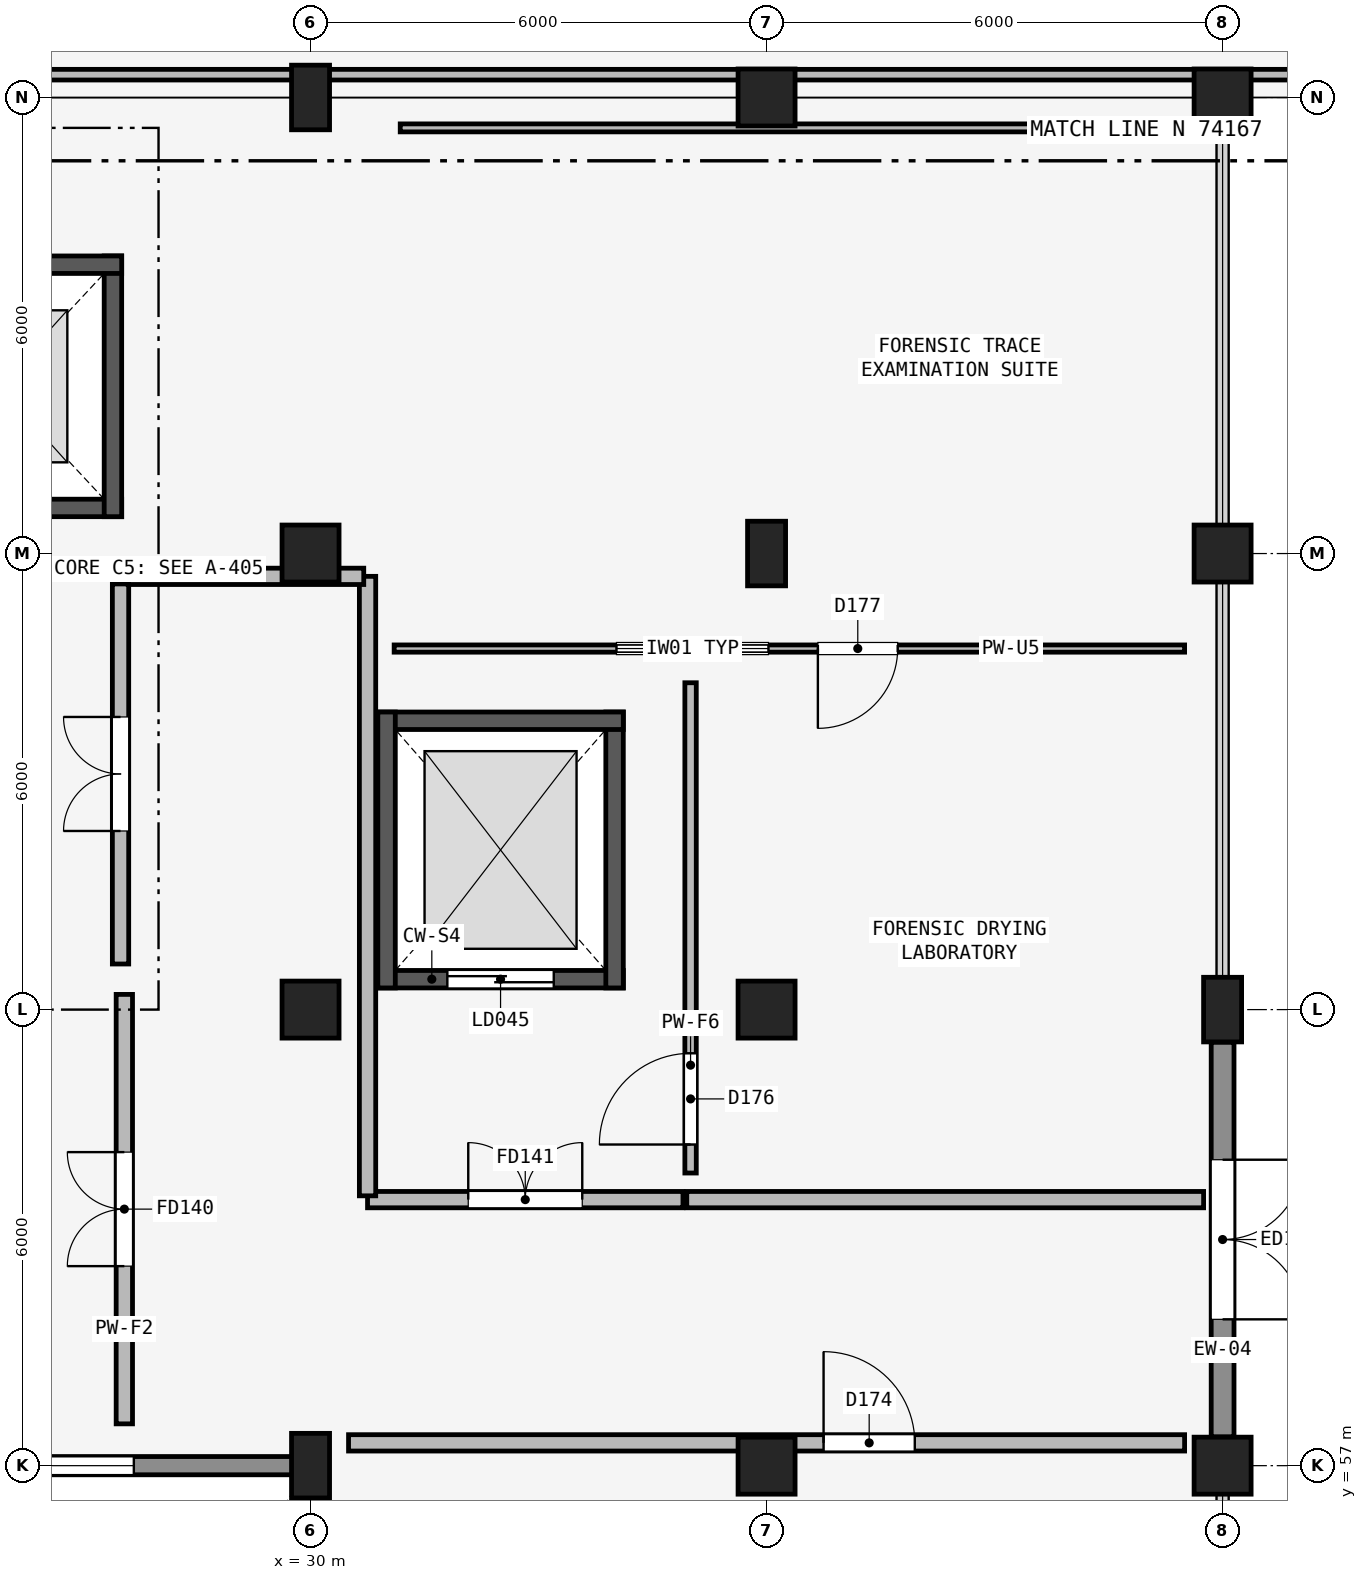
"""IFC4 building model, lengths in metres.
Left out: names, types, materials, properties, quantities, classifications, styles, units other than length and angle.
Written with IfcOpenShell. Run it as: python <this file> out.ifc"""

import sys

from ifc_helpers import new_model, si_unit, direction, frame, frame_2d, origin, origin_2d, place, context, subcontext, project, spatial, rectangle, extrude, element, fill, save


model = new_model("IFC4")
c1 = context("Model", 3, precision=1e-05, world=origin(), true_north=direction((0.0, 1.0)))
c2 = subcontext(c1, "Body", "Model", "MODEL_VIEW")
j1 = project(units=[si_unit("LENGTHUNIT", "METRE"), si_unit("PLANEANGLEUNIT", "RADIAN")], contexts=[c1])
p1 = place(None, origin())
s1 = spatial("IfcSite", under=j1, at=p1, CompositionType="ELEMENT")
p2 = place(p1, origin())
s2 = spatial("IfcBuilding", under=s1, at=p2, CompositionType="ELEMENT")
p3 = place(p2, origin())
s3 = spatial("IfcBuildingStorey", under=s2, at=p3, CompositionType="ELEMENT", Elevation=0.0)
p4 = place(p3, frame((30.0, 57.0, 0.0), z_axis=(0.0, 0.0, 1.0), x_axis=(1.0, 0.0, 0.0)))
e1 = element("IfcColumn", 1, at=p4, inside=s3, PredefinedType="COLUMN", context=c2, shape_type="SweptSolid", body=[
    extrude(rectangle(XDim=0.5, YDim=0.85, at=origin_2d()), origin(), (0.0, 0.0, 1.0), 4.8),
])
for number, where, z_axis, x_axis in (
    (2, (30.0, 63.0, 0.0), (0.0, 0.0, 1.0), (1.0, 0.0, 0.0)),
    (3, (30.0, 69.0, 0.0), (0.0, 0.0, 1.0), (1.0, 0.0, 0.0)),
):
    element("IfcColumn", number, at=place(p3, frame(where, z_axis=z_axis, x_axis=x_axis)), inside=s3, PredefinedType="COLUMN", context=c2, shape_type="SweptSolid", body=[
        extrude(rectangle(XDim=0.75, YDim=0.75, at=origin_2d()), origin(), (0.0, 0.0, 1.0), 4.8),
    ])
p5 = place(p3, frame((30.0, 75.0, 0.0), z_axis=(0.0, 0.0, 1.0), x_axis=(1.0, 0.0, 0.0)))
e4 = element("IfcColumn", 4, at=p5, inside=s3, PredefinedType="COLUMN", context=c2, shape_type="SweptSolid", body=[
    extrude(rectangle(XDim=0.5, YDim=0.85, at=origin_2d()), origin(), (0.0, 0.0, 1.0), 4.8),
])
for number, where, z_axis, x_axis in (
    (5, (36.0, 57.0, 0.0), (0.0, 0.0, 1.0), (1.0, 0.0, 0.0)),
    (6, (36.0, 63.0, 0.0), (0.0, 0.0, 1.0), (1.0, 0.0, 0.0)),
):
    element("IfcColumn", number, at=place(p3, frame(where, z_axis=z_axis, x_axis=x_axis)), inside=s3, PredefinedType="COLUMN", context=c2, shape_type="SweptSolid", body=[
        extrude(rectangle(XDim=0.75, YDim=0.75, at=origin_2d()), origin(), (0.0, 0.0, 1.0), 4.8),
    ])
p6 = place(p3, frame((36.0, 69.0, 0.0), z_axis=(0.0, 0.0, 1.0), x_axis=(1.0, 0.0, 0.0)))
e7 = element("IfcColumn", 7, at=p6, inside=s3, PredefinedType="COLUMN", context=c2, shape_type="SweptSolid", body=[
    extrude(rectangle(XDim=0.5, YDim=0.85, at=origin_2d()), origin(), (0.0, 0.0, 1.0), 4.8),
])
for number, where, z_axis, x_axis in (
    (8, (36.0, 75.0, 0.0), (0.0, 0.0, 1.0), (1.0, 0.0, 0.0)),
    (9, (42.0, 57.0, 0.0), (0.0, 0.0, 1.0), (1.0, 0.0, 0.0)),
):
    element("IfcColumn", number, at=place(p3, frame(where, z_axis=z_axis, x_axis=x_axis)), inside=s3, PredefinedType="COLUMN", context=c2, shape_type="SweptSolid", body=[
        extrude(rectangle(XDim=0.75, YDim=0.75, at=origin_2d()), origin(), (0.0, 0.0, 1.0), 4.8),
    ])
p7 = place(p3, frame((42.0, 63.0, 0.0), z_axis=(0.0, 0.0, 1.0), x_axis=(1.0, 0.0, 0.0)))
e10 = element("IfcColumn", 10, at=p7, inside=s3, PredefinedType="COLUMN", context=c2, shape_type="SweptSolid", body=[
    extrude(rectangle(XDim=0.5, YDim=0.85, at=origin_2d()), origin(), (0.0, 0.0, 1.0), 4.8),
])
for number, where, z_axis, x_axis in (
    (11, (42.0, 69.0, 0.0), (0.0, 0.0, 1.0), (1.0, 0.0, 0.0)),
    (12, (42.0, 75.0, 0.0), (0.0, 0.0, 1.0), (1.0, 0.0, 0.0)),
):
    element("IfcColumn", number, at=place(p3, frame(where, z_axis=z_axis, x_axis=x_axis)), inside=s3, PredefinedType="COLUMN", context=c2, shape_type="SweptSolid", body=[
        extrude(rectangle(XDim=0.75, YDim=0.75, at=origin_2d()), origin(), (0.0, 0.0, 1.0), 4.8),
    ])
p8 = place(p3, frame((42.0, 57.379, 0.0), z_axis=(0.0, 0.0, 1.0), x_axis=(0.0, 1.0, 0.0)))
e13 = element("IfcWall", 13, at=p8, inside=s3, PredefinedType="SOLIDWALL", context=c2, shape_type="SweptSolid", body=[
    extrude(rectangle(XDim=5.192, YDim=0.3, at=frame_2d((2.596, 0.0))), origin(), (0.0, 0.0, 1.0), 3.99),
])
p9 = place(p8, frame((1.546, 0.0, 0.0)))
e14 = element("IfcOpeningElement", 14, at=p9, cuts=e13, PredefinedType="OPENING", context=c2, shape_type="SweptSolid", body=[
    extrude(rectangle(XDim=2.1, YDim=2.4, at=frame_2d((1.05, 1.2))), frame((0.0, 0.16, 0.0), z_axis=(0.0, -1.0, 0.0), x_axis=(1.0, 0.0, 0.0)), (0.0, 0.0, 1.0), 0.32),
])
p10 = place(p3, frame((24.0, 57.0, 0.0), z_axis=(0.0, 0.0, 1.0), x_axis=(1.0, 0.0, 0.0)))
e15 = element("IfcWall", 15, at=p10, inside=s3, PredefinedType="SOLIDWALL", context=c2, shape_type="SweptSolid", body=[
    extrude(rectangle(XDim=5.95, YDim=0.24, at=frame_2d((2.975, 0.0))), origin(), (0.0, 0.0, 1.0), 3.89),
])
p11 = place(p10, frame((2.275, 0.0, 0.85)))
e16 = element("IfcOpeningElement", 16, at=p11, cuts=e15, PredefinedType="OPENING", context=c2, shape_type="SweptSolid", body=[
    extrude(rectangle(XDim=1.4, YDim=1.8, at=frame_2d((0.7, 0.9))), frame((0.0, 0.13, 0.0), z_axis=(0.0, -1.0, 0.0), x_axis=(1.0, 0.0, 0.0)), (0.0, 0.0, 1.0), 0.26),
])
p12 = place(p3, frame((27.5, 63.6, 0.0), z_axis=(0.0, 0.0, 1.0), x_axis=(0.0, 1.0, 0.0)))
e17 = element("IfcWall", 17, at=p12, inside=s3, PredefinedType="PARTITIONING", context=c2, shape_type="SweptSolid", body=[
    extrude(rectangle(XDim=5.0, YDim=0.215, at=frame_2d((2.5, 0.0))), origin(), (0.0, 0.0, 1.0), 4.49),
])
p13 = place(p12, frame((1.75, 0.0, 0.0)))
e18 = element("IfcOpeningElement", 18, at=p13, cuts=e17, PredefinedType="OPENING", context=c2, shape_type="SweptSolid", body=[
    extrude(rectangle(XDim=1.5, YDim=2.15, at=frame_2d((0.75, 1.075))), frame((0.0, 0.117, 0.0), z_axis=(0.0, -1.0, 0.0), x_axis=(1.0, 0.0, 0.0)), (0.0, 0.0, 1.0), 0.235),
])
p14 = place(p3, frame((24.285, 69.6, 0.0), z_axis=(0.0, 0.0, 1.0), x_axis=(1.0, 0.0, 0.0)))
e19 = element("IfcWall", 19, at=p14, inside=s3, PredefinedType="SHEAR", context=c2, shape_type="SweptSolid", body=[
    extrude(rectangle(XDim=3.23, YDim=0.23, at=frame_2d((1.615, 0.0))), origin(), (0.0, 0.0, 1.0), 4.8),
])
p15 = place(p14, frame((1.115, 0.0, 0.0)))
e20 = element("IfcOpeningElement", 20, at=p15, cuts=e19, PredefinedType="OPENING", context=c2, shape_type="SweptSolid", body=[
    extrude(rectangle(XDim=1.0, YDim=2.15, at=frame_2d((0.5, 1.075))), frame((0.0, 0.125, 0.0), z_axis=(0.0, -1.0, 0.0), x_axis=(1.0, 0.0, 0.0)), (0.0, 0.0, 1.0), 0.25),
])
p16 = place(p3, frame((27.4, 69.485, 0.0), z_axis=(0.0, 0.0, 1.0), x_axis=(0.0, 1.0, 0.0)))
e21 = element("IfcWall", 21, at=p16, inside=s3, PredefinedType="SHEAR", context=c2, shape_type="SweptSolid", body=[
    extrude(rectangle(XDim=3.43, YDim=0.23, at=frame_2d((1.715, 0.0))), origin(), (0.0, 0.0, 1.0), 4.8),
])
p17 = place(p3, frame((27.515, 72.8, 0.0), z_axis=(0.0, 0.0, 1.0), x_axis=(-1.0, 0.0, 0.0)))
e22 = element("IfcWall", 22, at=p17, inside=s3, PredefinedType="SHEAR", context=c2, shape_type="SweptSolid", body=[
    extrude(rectangle(XDim=3.23, YDim=0.23, at=frame_2d((1.615, 0.0))), origin(), (0.0, 0.0, 1.0), 4.8),
])
p18 = place(p3, frame((30.885, 63.4, 0.0), z_axis=(0.0, 0.0, 1.0), x_axis=(1.0, 0.0, 0.0)))
e23 = element("IfcWall", 23, at=p18, inside=s3, PredefinedType="SHEAR", context=c2, shape_type="SweptSolid", body=[
    extrude(rectangle(XDim=3.23, YDim=0.23, at=frame_2d((1.615, 0.0))), origin(), (0.0, 0.0, 1.0), 4.8),
])
p19 = place(p18, frame((0.915, 0.0, 0.0)))
e24 = element("IfcOpeningElement", 24, at=p19, cuts=e23, PredefinedType="OPENING", context=c2, shape_type="SweptSolid", body=[
    extrude(rectangle(XDim=1.4, YDim=2.3, at=frame_2d((0.7, 1.15))), frame((0.0, 0.125, 0.0), z_axis=(0.0, -1.0, 0.0), x_axis=(1.0, 0.0, 0.0)), (0.0, 0.0, 1.0), 0.25),
])
p20 = place(p3, frame((34.0, 63.285, 0.0), z_axis=(0.0, 0.0, 1.0), x_axis=(0.0, 1.0, 0.0)))
e25 = element("IfcWall", 25, at=p20, inside=s3, PredefinedType="SHEAR", context=c2, shape_type="SweptSolid", body=[
    extrude(rectangle(XDim=3.63, YDim=0.23, at=frame_2d((1.815, 0.0))), origin(), (0.0, 0.0, 1.0), 4.8),
])
p21 = place(p3, frame((34.115, 66.8, 0.0), z_axis=(0.0, 0.0, 1.0), x_axis=(-1.0, 0.0, 0.0)))
e26 = element("IfcWall", 26, at=p21, inside=s3, PredefinedType="SHEAR", context=c2, shape_type="SweptSolid", body=[
    extrude(rectangle(XDim=3.23, YDim=0.23, at=frame_2d((1.615, 0.0))), origin(), (0.0, 0.0, 1.0), 4.8),
])
p22 = place(p3, frame((31.0, 66.915, 0.0), z_axis=(0.0, 0.0, 1.0), x_axis=(0.0, -1.0, 0.0)))
e27 = element("IfcWall", 27, at=p22, inside=s3, PredefinedType="SHEAR", context=c2, shape_type="SweptSolid", body=[
    extrude(rectangle(XDim=3.63, YDim=0.23, at=frame_2d((1.815, 0.0))), origin(), (0.0, 0.0, 1.0), 4.8),
])
p23 = place(p3, frame((27.55, 57.55, 0.0), z_axis=(0.0, 0.0, 1.0), x_axis=(0.0, 1.0, 0.0)))
e28 = element("IfcWall", 28, at=p23, inside=s3, PredefinedType="PARTITIONING", context=c2, shape_type="SweptSolid", body=[
    extrude(rectangle(XDim=5.65, YDim=0.215, at=frame_2d((2.825, 0.0))), origin(), (0.0, 0.0, 1.0), 4.09),
])
p24 = place(p23, frame((2.075, 0.0, 0.0)))
e29 = element("IfcOpeningElement", 29, at=p24, cuts=e28, PredefinedType="OPENING", context=c2, shape_type="SweptSolid", body=[
    extrude(rectangle(XDim=1.5, YDim=2.15, at=frame_2d((0.75, 1.075))), frame((0.0, 0.117, 0.0), z_axis=(0.0, -1.0, 0.0), x_axis=(1.0, 0.0, 0.0)), (0.0, 0.0, 1.0), 0.235),
])
p25 = place(p3, frame((30.75, 60.5, 0.0), z_axis=(0.0, 0.0, 1.0), x_axis=(1.0, 0.0, 0.0)))
e30 = element("IfcWall", 30, at=p25, inside=s3, PredefinedType="PARTITIONING", context=c2, shape_type="SweptSolid", body=[
    extrude(rectangle(XDim=4.15, YDim=0.215, at=frame_2d((2.075, 0.0))), origin(), (0.0, 0.0, 1.0), 4.09),
])
p26 = place(p25, frame((1.325, 0.0, 0.0)))
e31 = element("IfcOpeningElement", 31, at=p26, cuts=e30, PredefinedType="OPENING", context=c2, shape_type="SweptSolid", body=[
    extrude(rectangle(XDim=1.5, YDim=2.15, at=frame_2d((0.75, 1.075))), frame((0.0, 0.117, 0.0), z_axis=(0.0, -1.0, 0.0), x_axis=(1.0, 0.0, 0.0)), (0.0, 0.0, 1.0), 0.235),
])
p27 = place(p3, frame((34.95, 60.5, 0.0), z_axis=(0.0, 0.0, 1.0), x_axis=(1.0, 0.0, 0.0)))
e32 = element("IfcWall", 32, at=p27, inside=s3, PredefinedType="PARTITIONING", context=c2, shape_type="SweptSolid", body=[
    extrude(rectangle(XDim=6.8, YDim=0.215, at=frame_2d((3.4, 0.0))), origin(), (0.0, 0.0, 1.0), 3.99),
])
p28 = place(p3, frame((30.75, 60.55, 0.0), z_axis=(0.0, 0.0, 1.0), x_axis=(0.0, 1.0, 0.0)))
e33 = element("IfcWall", 33, at=p28, inside=s3, PredefinedType="PARTITIONING", context=c2, shape_type="SweptSolid", body=[
    extrude(rectangle(XDim=8.15, YDim=0.215, at=frame_2d((4.075, 0.0))), origin(), (0.0, 0.0, 1.0), 3.89),
])
p29 = place(p3, frame((27.6, 68.7, 0.0), z_axis=(0.0, 0.0, 1.0), x_axis=(1.0, 0.0, 0.0)))
e34 = element("IfcWall", 34, at=p29, inside=s3, PredefinedType="PARTITIONING", context=c2, shape_type="SweptSolid", body=[
    extrude(rectangle(XDim=3.1, YDim=0.215, at=frame_2d((1.55, 0.0))), origin(), (0.0, 0.0, 1.0), 4.04),
])
p30 = place(p3, frame((30.5, 57.3, 0.0), z_axis=(0.0, 0.0, 1.0), x_axis=(1.0, 0.0, 0.0)))
e35 = element("IfcWall", 35, at=p30, inside=s3, PredefinedType="PARTITIONING", context=c2, shape_type="SweptSolid", body=[
    extrude(rectangle(XDim=11.0, YDim=0.215, at=frame_2d((5.5, 0.0))), origin(), (0.0, 0.0, 1.0), 3.99),
])
p31 = place(p30, frame((6.25, 0.0, 0.0)))
e36 = element("IfcOpeningElement", 36, at=p31, cuts=e35, PredefinedType="OPENING", context=c2, shape_type="SweptSolid", body=[
    extrude(rectangle(XDim=1.2, YDim=2.15, at=frame_2d((0.6, 1.075))), frame((0.0, 0.117, 0.0), z_axis=(0.0, -1.0, 0.0), x_axis=(1.0, 0.0, 0.0)), (0.0, 0.0, 1.0), 0.235),
])
p32 = place(p3, frame((35.0, 60.85, 0.0), z_axis=(0.0, 0.0, 1.0), x_axis=(0.0, 1.0, 0.0)))
e37 = element("IfcWall", 37, at=p32, inside=s3, PredefinedType="PARTITIONING", context=c2, shape_type="SweptSolid", body=[
    extrude(rectangle(XDim=6.45, YDim=0.15, at=frame_2d((3.225, 0.0))), origin(), (0.0, 0.0, 1.0), 3.89),
])
p33 = place(p32, frame((0.375, 0.0, 0.0)))
e38 = element("IfcOpeningElement", 38, at=p33, cuts=e37, PredefinedType="OPENING", context=c2, shape_type="SweptSolid", body=[
    extrude(rectangle(XDim=1.2, YDim=2.15, at=frame_2d((0.6, 1.075))), frame((0.0, 0.085, 0.0), z_axis=(0.0, -1.0, 0.0), x_axis=(1.0, 0.0, 0.0)), (0.0, 0.0, 1.0), 0.17),
])
p34 = place(p3, frame((41.5, 67.75, 0.0), z_axis=(0.0, 0.0, 1.0), x_axis=(-1.0, 0.0, 0.0)))
e39 = element("IfcWall", 39, at=p34, inside=s3, PredefinedType="PARTITIONING", context=c2, shape_type="SweptSolid", body=[
    extrude(rectangle(XDim=10.4, YDim=0.095, at=frame_2d((5.2, 0.0))), origin(), (0.0, 0.0, 1.0), 4.04),
])
p35 = place(p34, frame((3.775, 0.0, 0.0)))
e40 = element("IfcOpeningElement", 40, at=p35, cuts=e39, PredefinedType="OPENING", context=c2, shape_type="SweptSolid", body=[
    extrude(rectangle(XDim=1.05, YDim=2.2, at=frame_2d((0.525, 1.1))), frame((0.0, 0.057, 0.0), z_axis=(0.0, -1.0, 0.0), x_axis=(1.0, 0.0, 0.0)), (0.0, 0.0, 1.0), 0.115),
])
p36 = place(p34, frame((5.475, 0.0, 1.0)))
e41 = element("IfcOpeningElement", 41, at=p36, cuts=e39, PredefinedType="OPENING", context=c2, shape_type="SweptSolid", body=[
    extrude(rectangle(XDim=2.0, YDim=1.2, at=frame_2d((1.0, 0.6))), frame((0.0, 0.057, 0.0), z_axis=(0.0, -1.0, 0.0), x_axis=(1.0, 0.0, 0.0)), (0.0, 0.0, 1.0), 0.115),
])
p37 = place(p3, frame((31.18, 74.6, 0.0), z_axis=(0.0, 0.0, 1.0), x_axis=(1.0, 0.0, 0.0)))
e42 = element("IfcWall", 42, at=p37, inside=s3, PredefinedType="PARTITIONING", context=c2, shape_type="SweptSolid", body=[
    extrude(rectangle(XDim=10.24, YDim=0.105, at=frame_2d((5.12, 0.0))), origin(), (0.0, 0.0, 1.0), 4.09),
])
p38 = place(p3, frame((47.42, 75.3, 0.0), z_axis=(0.0, 0.0, 1.0), x_axis=(-1.0, 0.0, 0.0)))
e43 = element("IfcWall", 43, at=p38, inside=s3, PredefinedType="PARTITIONING", context=c2, shape_type="SweptSolid", body=[
    extrude(rectangle(XDim=34.84, YDim=0.14, at=frame_2d((17.42, 0.0))), origin(), (0.0, 0.0, 1.0), 3.29),
])
p39 = place(p9, frame((2.1, 0.0, 0.0), z_axis=(0.0, 0.0, 1.0), x_axis=(-1.0, 0.0, 0.0)))
e44 = element("IfcDoor", 44, at=p39, inside=s3, OperationType="DOUBLE_DOOR_SINGLE_SWING", PredefinedType="DOOR", context=c2, shape_type="SweptSolid", body=[
    extrude(rectangle(XDim=2.1, YDim=2.4, at=frame_2d((1.05, 1.2))), frame((0.0, 0.025, 0.0), z_axis=(0.0, -1.0, 0.0), x_axis=(1.0, 0.0, 0.0)), (0.0, 0.0, 1.0), 0.05),
])
fill(e14, e44)
p40 = place(p11, origin())
e45 = element("IfcWindow", 45, at=p40, inside=s3, PartitioningType="SINGLE_PANEL", PredefinedType="WINDOW", context=c2, shape_type="SweptSolid", body=[
    extrude(rectangle(XDim=1.4, YDim=1.8, at=frame_2d((0.7, 0.9))), frame((0.0, 0.03, 0.0), z_axis=(0.0, -1.0, 0.0), x_axis=(1.0, 0.0, 0.0)), (0.0, 0.0, 1.0), 0.06),
])
fill(e16, e45)
p41 = place(p13, origin())
e46 = element("IfcDoor", 46, at=p41, inside=s3, OperationType="DOUBLE_DOOR_SINGLE_SWING", PredefinedType="DOOR", context=c2, shape_type="SweptSolid", body=[
    extrude(rectangle(XDim=1.5, YDim=2.15, at=frame_2d((0.75, 1.075))), frame((0.0, 0.025, 0.0), z_axis=(0.0, -1.0, 0.0), x_axis=(1.0, 0.0, 0.0)), (0.0, 0.0, 1.0), 0.05),
])
fill(e18, e46)
p42 = place(p19, origin())
e47 = element("IfcDoor", 47, at=p42, inside=s3, OperationType="SLIDING_TO_LEFT", PredefinedType="DOOR", context=c2, shape_type="SweptSolid", body=[
    extrude(rectangle(XDim=1.4, YDim=2.3, at=frame_2d((0.7, 1.15))), frame((0.0, 0.025, 0.0), z_axis=(0.0, -1.0, 0.0), x_axis=(1.0, 0.0, 0.0)), (0.0, 0.0, 1.0), 0.05),
])
fill(e24, e47)
p43 = place(p24, origin())
e48 = element("IfcDoor", 48, at=p43, inside=s3, OperationType="DOUBLE_DOOR_SINGLE_SWING", PredefinedType="DOOR", context=c2, shape_type="SweptSolid", body=[
    extrude(rectangle(XDim=1.5, YDim=2.15, at=frame_2d((0.75, 1.075))), frame((0.0, 0.025, 0.0), z_axis=(0.0, -1.0, 0.0), x_axis=(1.0, 0.0, 0.0)), (0.0, 0.0, 1.0), 0.05),
])
fill(e29, e48)
p44 = place(p26, origin())
e49 = element("IfcDoor", 49, at=p44, inside=s3, OperationType="DOUBLE_DOOR_SINGLE_SWING", PredefinedType="DOOR", context=c2, shape_type="SweptSolid", body=[
    extrude(rectangle(XDim=1.5, YDim=2.15, at=frame_2d((0.75, 1.075))), frame((0.0, 0.025, 0.0), z_axis=(0.0, -1.0, 0.0), x_axis=(1.0, 0.0, 0.0)), (0.0, 0.0, 1.0), 0.05),
])
fill(e31, e49)
p45 = place(p31, origin())
e50 = element("IfcDoor", 50, at=p45, inside=s3, OperationType="SINGLE_SWING_LEFT", PredefinedType="DOOR", context=c2, shape_type="SweptSolid", body=[
    extrude(rectangle(XDim=1.2, YDim=2.15, at=frame_2d((0.6, 1.075))), frame((0.0, 0.025, 0.0), z_axis=(0.0, -1.0, 0.0), x_axis=(1.0, 0.0, 0.0)), (0.0, 0.0, 1.0), 0.05),
])
fill(e36, e50)
p46 = place(p33, origin())
e51 = element("IfcDoor", 51, at=p46, inside=s3, OperationType="SINGLE_SWING_LEFT", PredefinedType="DOOR", context=c2, shape_type="SweptSolid", body=[
    extrude(rectangle(XDim=1.2, YDim=2.15, at=frame_2d((0.6, 1.075))), frame((0.0, 0.025, 0.0), z_axis=(0.0, -1.0, 0.0), x_axis=(1.0, 0.0, 0.0)), (0.0, 0.0, 1.0), 0.05),
])
fill(e38, e51)
p47 = place(p35, origin())
e52 = element("IfcDoor", 52, at=p47, inside=s3, OperationType="SINGLE_SWING_RIGHT", PredefinedType="DOOR", context=c2, shape_type="SweptSolid", body=[
    extrude(rectangle(XDim=1.05, YDim=2.2, at=frame_2d((0.525, 1.1))), frame((0.0, 0.025, 0.0), z_axis=(0.0, -1.0, 0.0), x_axis=(1.0, 0.0, 0.0)), (0.0, 0.0, 1.0), 0.05),
])
fill(e40, e52)
p48 = place(p36, origin())
e53 = element("IfcWindow", 53, at=p48, inside=s3, PartitioningType="SINGLE_PANEL", PredefinedType="WINDOW", context=c2, shape_type="SweptSolid", body=[
    extrude(rectangle(XDim=2.0, YDim=1.2, at=frame_2d((1.0, 0.6))), frame((0.0, 0.03, 0.0), z_axis=(0.0, -1.0, 0.0), x_axis=(1.0, 0.0, 0.0)), (0.0, 0.0, 1.0), 0.06),
])
fill(e41, e53)
save(model, sys.argv[1])
